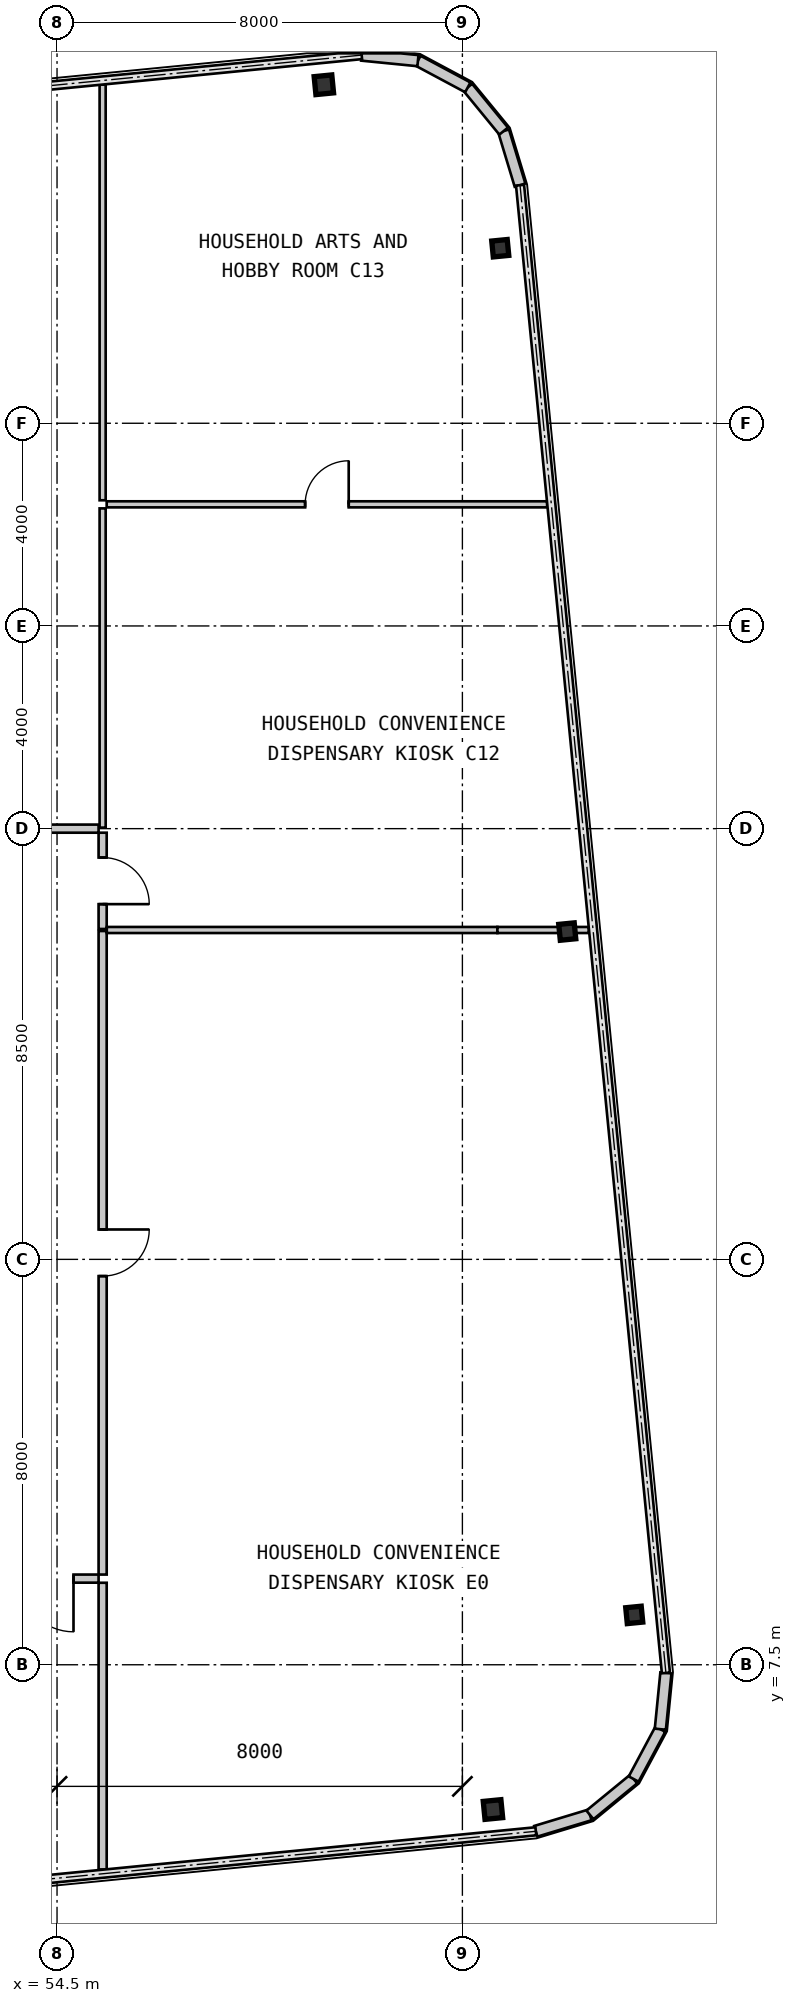
"""IFC4 building model, lengths in metres.
Left out: names, types, materials, properties, quantities, classifications, styles, units other than length and angle.
Written with IfcOpenShell. Run it as: python <this file> out.ifc"""

import sys

from ifc_helpers import new_model, si_unit, direction, frame, frame_2d, origin, origin_2d, place, context, subcontext, project, spatial, rectangle, i_section, extrude, source, transform, mapped, element, fill, save


model = new_model("IFC4")
c1 = context("Model", 3, precision=1e-05, world=origin(), true_north=direction((0.0, 1.0)))
c2 = subcontext(c1, "Body", "Model", "MODEL_VIEW")
j1 = project(units=[si_unit("LENGTHUNIT", "METRE"), si_unit("PLANEANGLEUNIT", "RADIAN")], contexts=[c1])
p1 = place(None, origin())
s1 = spatial("IfcSite", under=j1, at=p1, CompositionType="ELEMENT")
p2 = place(p1, origin())
s2 = spatial("IfcBuilding", under=s1, at=p2, CompositionType="ELEMENT")
p3 = place(p2, frame((0.0, 0.0, 80.85)))
s3 = spatial("IfcBuildingStorey", under=s2, at=p3, CompositionType="ELEMENT", Elevation=80.85)
m1 = source(origin(), c2, "Body", "SweptSolid", [
    extrude(i_section(OverallWidth=0.35, OverallDepth=0.356, WebThickness=0.018, FlangeThickness=0.028, at=origin_2d()), origin(), (0.0, 0.0, 1.0), 3.15),
])
for number, where, z_axis, x_axis in (
    (1, (63.103, 4.643, 0.0), (0.0, 0.0, 1.0), (0.995, 0.098, 0.0)),
    (2, (59.766, 38.68, 0.0), (0.0, 0.0, 1.0), (0.995, 0.098, 0.0)),
):
    element("IfcColumn", number, at=place(p3, frame(where, z_axis=z_axis, x_axis=x_axis)), inside=s3, PredefinedType="COLUMN", context=c2, shape_type="MappedRepresentation", body=[
        mapped(m1, transform((0.0, 0.0, 0.0), scale=1.0)),
    ])
m2 = source(origin(), c2, "Body", "SweptSolid", [
    extrude(i_section(OverallWidth=0.307, OverallDepth=0.315, WebThickness=0.012, FlangeThickness=0.019, at=origin_2d()), origin(), (0.0, 0.0, 1.0), 3.15),
])
for number, where, z_axis, x_axis in (
    (3, (65.892, 8.484, 0.0), (0.0, 0.0, 1.0), (0.995, 0.098, 0.0)),
    (4, (64.57, 21.969, 0.0), (0.0, 0.0, 1.0), (0.995, 0.098, 0.0)),
    (5, (63.247, 35.454, 0.0), (0.0, 0.0, 1.0), (0.995, 0.098, 0.0)),
):
    element("IfcColumn", number, at=place(p3, frame(where, z_axis=z_axis, x_axis=x_axis)), inside=s3, PredefinedType="COLUMN", context=c2, shape_type="MappedRepresentation", body=[
        mapped(m2, transform((0.0, 0.0, 0.0), scale=1.0)),
    ])
m3 = source(origin(), c2, "Body", "SweptSolid", [
    extrude(rectangle(XDim=1.116, YDim=0.22, at=frame_2d((0.558, 0.0))), origin(), (0.0, 0.0, 1.0), 2.93),
])
p4 = place(p3, frame((63.949, 4.214, 0.0), z_axis=(0.0, 0.0, 1.0), x_axis=(0.957052003726, 0.289916301997, 0.0)))
e6 = element("IfcWall", 6, at=p4, inside=s3, PredefinedType="SOLIDWALL", context=c2, shape_type="MappedRepresentation", body=[
    mapped(m3, transform((0.0, 0.0, 0.0), scale=1.0)),
])
m4 = source(origin(), c2, "Body", "SweptSolid", [
    extrude(rectangle(XDim=1.116, YDim=0.22, at=frame_2d((0.558, 0.0))), origin(), (0.0, 0.0, 1.0), 2.93),
])
p5 = place(p3, frame((65.017, 4.537, 0.0), z_axis=(0.0, 0.0, 1.0), x_axis=(0.773342870285, 0.633988016432, 0.0)))
e7 = element("IfcWall", 7, at=p5, inside=s3, PredefinedType="SOLIDWALL", context=c2, shape_type="MappedRepresentation", body=[
    mapped(m4, transform((0.0, 0.0, 0.0), scale=1.0)),
])
p6 = place(p3, frame((65.88, 5.245, 0.0), z_axis=(0.0, 0.0, 1.0), x_axis=(0.471723463201, 0.881746547635, 0.0)))
e8 = element("IfcWall", 8, at=p6, inside=s3, PredefinedType="SOLIDWALL", context=c2, shape_type="MappedRepresentation", body=[
    mapped(m3, transform((0.0, 0.0, 0.0), scale=1.0)),
])
for number, where, z_axis, x_axis in (
    (9, (66.406, 6.229, 0.0), (0.0, 0.0, 1.0), (0.098, 0.995, 0.0)),
    (10, (63.638, 36.698, 0.0), (0.0, 0.0, 1.0), (-0.29, 0.957, 0.0)),
):
    element("IfcWall", number, at=place(p3, frame(where, z_axis=z_axis, x_axis=x_axis)), inside=s3, PredefinedType="SOLIDWALL", context=c2, shape_type="MappedRepresentation", body=[
        mapped(m4, transform((0.0, 0.0, 0.0), scale=1.0)),
    ])
p7 = place(p3, frame((63.314, 37.766, 0.0), z_axis=(0.0, 0.0, 1.0), x_axis=(-0.634095287989, 0.773254916409, 0.0)))
e11 = element("IfcWall", 11, at=p7, inside=s3, PredefinedType="SOLIDWALL", context=c2, shape_type="MappedRepresentation", body=[
    mapped(m3, transform((0.0, 0.0, 0.0), scale=1.0)),
])
for number, where, z_axis, x_axis in (
    (12, (62.607, 38.629, 0.0), (0.0, 0.0, 1.0), (-0.882, 0.472, 0.0)),
    (13, (61.623, 39.156, 0.0), (0.0, 0.0, 1.0), (-0.995, 0.098, 0.0)),
):
    element("IfcWall", number, at=place(p3, frame(where, z_axis=z_axis, x_axis=x_axis)), inside=s3, PredefinedType="SOLIDWALL", context=c2, shape_type="MappedRepresentation", body=[
        mapped(m4, transform((0.0, 0.0, 0.0), scale=1.0)),
    ])
m5 = source(origin(), c2, "Body", "SweptSolid", [
    extrude(rectangle(XDim=2.04, YDim=0.16, at=frame_2d((1.02, 0.0))), origin(), (0.0, 0.0, 1.0), 2.93),
])
p8 = place(p3, frame((55.32, 9.2, 0.0), z_axis=(0.0, 0.0, 1.0), x_axis=(-1.0, 0.0, 0.0)))
e14 = element("IfcWall", 14, at=p8, inside=s3, PredefinedType="PARTITIONING", context=c2, shape_type="MappedRepresentation", body=[
    mapped(m5, transform((0.0, 0.0, 0.0), scale=1.0)),
])
m6 = source(origin(), c2, "Body", "SweptSolid", [
    extrude(rectangle(XDim=1.05, YDim=2.1, at=frame_2d((0.525, 1.05))), frame((0.0, 0.09, 0.0), z_axis=(0.0, -1.0, 0.0), x_axis=(1.0, 0.0, 0.0)), (0.0, 0.0, 1.0), 0.18),
])
p9 = place(p8, frame((0.495, 0.0, 0.0)))
e15 = element("IfcOpeningElement", 15, at=p9, cuts=e14, PredefinedType="OPENING", context=c2, shape_type="MappedRepresentation", body=[
    mapped(m6, transform((0.0, 0.0, 0.0), scale=1.0)),
])
m7 = source(origin(), c2, "Body", "SweptSolid", [
    extrude(rectangle(XDim=12.7, YDim=0.16, at=frame_2d((6.35, 0.0))), origin(), (0.0, 0.0, 1.0), 2.93),
])
p10 = place(p3, frame((55.4, 21.98, 0.0), z_axis=(0.0, 0.0, 1.0), x_axis=(0.0, -1.0, 0.0)))
e16 = element("IfcWall", 16, at=p10, inside=s3, PredefinedType="PARTITIONING", context=c2, shape_type="MappedRepresentation", body=[
    mapped(m7, transform((0.0, 0.0, 0.0), scale=1.0)),
])
m8 = source(origin(), c2, "Body", "SweptSolid", [
    extrude(rectangle(XDim=0.92, YDim=2.1, at=frame_2d((0.46, 1.05))), frame((0.0, 0.09, 0.0), z_axis=(0.0, -1.0, 0.0), x_axis=(1.0, 0.0, 0.0)), (0.0, 0.0, 1.0), 0.18),
])
p11 = place(p10, frame((5.89, 0.0, 0.0)))
e17 = element("IfcOpeningElement", 17, at=p11, cuts=e16, PredefinedType="OPENING", context=c2, shape_type="MappedRepresentation", body=[
    mapped(m8, transform((0.0, 0.0, 0.0), scale=1.0)),
])
m9 = source(origin(), c2, "Body", "SweptSolid", [
    extrude(rectangle(XDim=1.9, YDim=0.16, at=frame_2d((0.95, 0.0))), origin(), (0.0, 0.0, 1.0), 2.93),
])
p12 = place(p3, frame((55.4, 23.92, 0.0), z_axis=(0.0, 0.0, 1.0), x_axis=(0.0, -1.0, 0.0)))
e18 = element("IfcWall", 18, at=p12, inside=s3, PredefinedType="PARTITIONING", context=c2, shape_type="MappedRepresentation", body=[
    mapped(m9, transform((0.0, 0.0, 0.0), scale=1.0)),
])
p13 = place(p12, frame((0.49, 0.0, 0.0)))
e19 = element("IfcOpeningElement", 19, at=p13, cuts=e18, PredefinedType="OPENING", context=c2, shape_type="MappedRepresentation", body=[
    mapped(m8, transform((0.0, 0.0, 0.0), scale=1.0)),
])
m10 = source(origin(), c2, "Body", "SweptSolid", [
    extrude(rectangle(XDim=3.016, YDim=0.16, at=frame_2d((1.508, 0.0))), origin(), (0.0, 0.0, 1.0), 2.93),
])
p14 = place(p3, frame((52.304, 24.0, 0.0), z_axis=(0.0, 0.0, 1.0), x_axis=(1.0, 0.0, 0.0)))
e20 = element("IfcWall", 20, at=p14, inside=s3, PredefinedType="PARTITIONING", context=c2, shape_type="MappedRepresentation", body=[
    mapped(m10, transform((0.0, 0.0, 0.0), scale=1.0)),
])
m11 = source(origin(), c2, "Body", "SweptSolid", [
    extrude(rectangle(XDim=5.658, YDim=0.16, at=frame_2d((2.829, 0.0))), origin(), (0.0, 0.0, 1.0), 2.93),
])
p15 = place(p3, frame((55.4, 9.118, 0.0), z_axis=(0.0, 0.0, 1.0), x_axis=(0.0, -1.0, 0.0)))
e21 = element("IfcWall", 21, at=p15, inside=s3, PredefinedType="PARTITIONING", context=c2, shape_type="MappedRepresentation", body=[
    mapped(m11, transform((0.0, 0.0, 0.0), scale=1.0)),
])
m12 = source(origin(), c2, "Body", "SweptSolid", [
    extrude(rectangle(XDim=7.709, YDim=0.12, at=frame_2d((3.854, 0.0))), origin(), (0.0, 0.0, 1.0), 2.93),
])
p16 = place(p3, frame((55.482, 22.0, 0.0), z_axis=(0.0, 0.0, 1.0), x_axis=(1.0, 0.0, 0.0)))
e22 = element("IfcWall", 22, at=p16, inside=s3, PredefinedType="PARTITIONING", context=c2, shape_type="MappedRepresentation", body=[
    mapped(m12, transform((0.0, 0.0, 0.0), scale=1.0)),
])
m13 = source(origin(), c2, "Body", "SweptSolid", [
    extrude(rectangle(XDim=1.392, YDim=0.12, at=frame_2d((0.696, 0.0))), origin(), (0.0, 0.0, 1.0), 2.328),
])
p17 = place(p3, frame((63.191, 22.0, 0.0), z_axis=(0.0, 0.0, 1.0), x_axis=(1.0, 0.0, 0.0)))
e23 = element("IfcWall", 23, at=p17, inside=s3, PredefinedType="PARTITIONING", context=c2, shape_type="MappedRepresentation", body=[
    mapped(m13, transform((0.0, 0.0, 0.0), scale=1.0)),
])
m14 = source(origin(), c2, "Body", "SweptSolid", [
    extrude(rectangle(XDim=0.411, YDim=0.12, at=frame_2d((0.206, 0.0))), origin(), (0.0, 0.0, 1.0), 2.93),
])
p18 = place(p3, frame((64.583, 22.0, 0.0), z_axis=(0.0, 0.0, 1.0), x_axis=(1.0, 0.0, 0.0)))
e24 = element("IfcWall", 24, at=p18, inside=s3, PredefinedType="PARTITIONING", context=c2, shape_type="MappedRepresentation", body=[
    mapped(m14, transform((0.0, 0.0, 0.0), scale=1.0)),
])
m15 = source(origin(), c2, "Body", "SweptSolid", [
    extrude(rectangle(XDim=8.693, YDim=0.12, at=frame_2d((4.346, 0.0))), origin(), (0.0, 0.0, 1.0), 2.93),
])
p19 = place(p3, frame((55.48, 30.4, 0.0), z_axis=(0.0, 0.0, 1.0), x_axis=(1.0, 0.0, 0.0)))
e25 = element("IfcWall", 25, at=p19, inside=s3, PredefinedType="PARTITIONING", context=c2, shape_type="MappedRepresentation", body=[
    mapped(m15, transform((0.0, 0.0, 0.0), scale=1.0)),
])
m16 = source(origin(), c2, "Body", "SweptSolid", [
    extrude(rectangle(XDim=0.86, YDim=2.1, at=frame_2d((0.43, 1.05))), frame((0.0, 0.07, 0.0), z_axis=(0.0, -1.0, 0.0), x_axis=(1.0, 0.0, 0.0)), (0.0, 0.0, 1.0), 0.14),
])
p20 = place(p19, frame((3.916, 0.0, 0.0)))
e26 = element("IfcOpeningElement", 26, at=p20, cuts=e25, PredefinedType="OPENING", context=c2, shape_type="MappedRepresentation", body=[
    mapped(m16, transform((0.0, 0.0, 0.0), scale=1.0)),
])
m17 = source(origin(), c2, "Body", "SweptSolid", [
    extrude(rectangle(XDim=6.3, YDim=0.12, at=frame_2d((3.15, 0.0))), origin(), (0.0, 0.0, 1.0), 2.93),
])
p21 = place(p3, frame((55.4, 24.02, 0.0), z_axis=(0.0, 0.0, 1.0), x_axis=(0.0, 1.0, 0.0)))
e27 = element("IfcWall", 27, at=p21, inside=s3, PredefinedType="PARTITIONING", context=c2, shape_type="MappedRepresentation", body=[
    mapped(m17, transform((0.0, 0.0, 0.0), scale=1.0)),
])
m18 = source(origin(), c2, "Body", "SweptSolid", [
    extrude(rectangle(XDim=8.202, YDim=0.12, at=frame_2d((4.101, 0.0))), origin(), (0.0, 0.0, 1.0), 2.93),
])
p22 = place(p3, frame((55.4, 30.48, 0.0), z_axis=(0.0, 0.0, 1.0), x_axis=(0.0, 1.0, 0.0)))
e28 = element("IfcWall", 28, at=p22, inside=s3, PredefinedType="PARTITIONING", context=c2, shape_type="MappedRepresentation", body=[
    mapped(m18, transform((0.0, 0.0, 0.0), scale=1.0)),
])
m19 = source(origin(), c2, "Body", "SweptSolid", [
    extrude(rectangle(XDim=1.05, YDim=2.1, at=frame_2d((0.525, 1.05))), frame((0.0, 0.025, 0.0), z_axis=(0.0, -1.0, 0.0), x_axis=(1.0, 0.0, 0.0)), (0.0, 0.0, 1.0), 0.05),
])
p23 = place(p9, origin())
e29 = element("IfcDoor", 29, at=p23, inside=s3, OperationType="SINGLE_SWING_LEFT", PredefinedType="DOOR", context=c2, shape_type="MappedRepresentation", body=[
    mapped(m19, transform((0.0, 0.0, 0.0), scale=1.0)),
])
fill(e15, e29)
m20 = source(origin(), c2, "Body", "SweptSolid", [
    extrude(rectangle(XDim=0.92, YDim=2.1, at=frame_2d((0.46, 1.05))), frame((0.0, 0.025, 0.0), z_axis=(0.0, -1.0, 0.0), x_axis=(1.0, 0.0, 0.0)), (0.0, 0.0, 1.0), 0.05),
])
p24 = place(p11, origin())
e30 = element("IfcDoor", 30, at=p24, inside=s3, OperationType="SINGLE_SWING_LEFT", PredefinedType="DOOR", context=c2, shape_type="MappedRepresentation", body=[
    mapped(m20, transform((0.0, 0.0, 0.0), scale=1.0)),
])
fill(e17, e30)
p25 = place(p13, origin())
e31 = element("IfcDoor", 31, at=p25, inside=s3, OperationType="SINGLE_SWING_RIGHT", PredefinedType="DOOR", context=c2, shape_type="MappedRepresentation", body=[
    mapped(m20, transform((0.0, 0.0, 0.0), scale=1.0)),
])
fill(e19, e31)
m21 = source(origin(), c2, "Body", "SweptSolid", [
    extrude(rectangle(XDim=0.86, YDim=2.1, at=frame_2d((0.43, 1.05))), frame((0.0, 0.025, 0.0), z_axis=(0.0, -1.0, 0.0), x_axis=(1.0, 0.0, 0.0)), (0.0, 0.0, 1.0), 0.05),
])
p26 = place(p20, origin())
e32 = element("IfcDoor", 32, at=p26, inside=s3, OperationType="SINGLE_SWING_RIGHT", PredefinedType="DOOR", context=c2, shape_type="MappedRepresentation", body=[
    mapped(m21, transform((0.0, 0.0, 0.0), scale=1.0)),
])
fill(e26, e32)
save(model, sys.argv[1])
